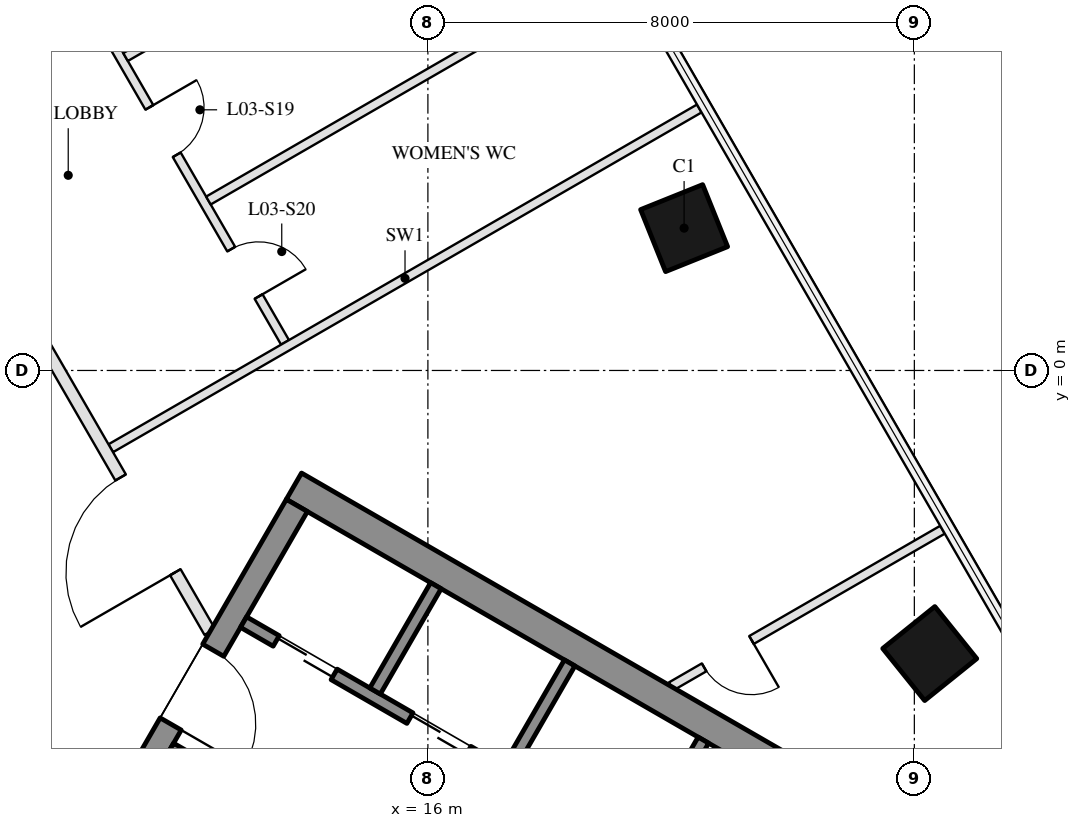
"""IFC4 building model, lengths in metres.
Left out: names, types, materials, properties, quantities, classifications, styles, units other than length and angle.
Written with IfcOpenShell. Run it as: python <this file> out.ifc"""

import sys

from ifc_helpers import new_model, si_unit, direction, frame, frame_2d, origin, origin_2d, place, context, subcontext, project, spatial, rectangle, hollow_rectangle, extrude, boolean, halfspace, element, fill, save


model = new_model("IFC4")
c1 = context("Model", 3, precision=1e-05, world=origin(), true_north=direction((0.0, 1.0)))
c2 = subcontext(c1, "Body", "Model", "MODEL_VIEW")
j1 = project(units=[si_unit("LENGTHUNIT", "METRE"), si_unit("PLANEANGLEUNIT", "RADIAN")], contexts=[c1])
p1 = place(None, origin())
s1 = spatial("IfcSite", under=j1, at=p1, CompositionType="ELEMENT")
p2 = place(p1, origin())
s2 = spatial("IfcBuilding", under=s1, at=p2, CompositionType="ELEMENT")
p3 = place(p2, frame((0.0, 0.0, 23.5)))
s3 = spatial("IfcBuildingStorey", under=s2, at=p3, CompositionType="ELEMENT", Elevation=23.5)
p4 = place(p3, frame((24.253, -4.656, 0.0), z_axis=(-0.066256812747, 0.010279549625, 0.997749650776), x_axis=(0.498832862409, -0.865677791145, 0.042044468106)))
e1 = element("IfcColumn", 1, at=p4, inside=s3, PredefinedType="COLUMN", context=c2, shape_type="SweptSolid", body=[
    boolean("DIFFERENCE", boolean("DIFFERENCE", extrude(hollow_rectangle(XDim=1.1, YDim=1.1, WallThickness=0.05, at=origin_2d()), origin(), (0.0, 0.0, 1.0), 5.011), halfspace(frame((0.0, 0.0, 0.017), z_axis=(0.0, 0.0, 1.0), x_axis=(1.0, 0.0, 0.0)), True)), halfspace(frame((0.0, 0.0, 4.999), z_axis=(0.0, 0.0, 1.0), x_axis=(1.0, 0.0, 0.0)), False)),
])
p5 = place(p3, frame((20.214, 2.341, 0.0), z_axis=(-0.055770669369, -0.007946345373, 0.998411983118), x_axis=(0.499656252381, -0.865968742186, 0.021018254285)))
e2 = element("IfcColumn", 2, at=p5, inside=s3, PredefinedType="COLUMN", context=c2, shape_type="SweptSolid", body=[
    boolean("DIFFERENCE", boolean("DIFFERENCE", extrude(hollow_rectangle(XDim=1.1, YDim=1.1, WallThickness=0.05, at=origin_2d()), origin(), (0.0, 0.0, 1.0), 5.008), halfspace(frame((0.0, 0.0, 0.014), z_axis=(0.0, 0.0, 1.0), x_axis=(1.0, 0.0, 0.0)), True)), halfspace(frame((0.0, 0.0, 4.997), z_axis=(0.0, 0.0, 1.0), x_axis=(1.0, 0.0, 0.0)), False)),
])
p6 = place(p3, frame((13.797, -1.903, 0.0), z_axis=(0.0, 0.0, 1.0), x_axis=(0.866025760136, -0.499999382781, 0.0)))
e3 = element("IfcWall", 3, at=p6, inside=s3, PredefinedType="SHEAR", context=c2, shape_type="SweptSolid", body=[
    extrude(rectangle(XDim=15.542, YDim=0.5, at=frame_2d((7.771, 0.0))), origin(), (0.0, 0.0, 1.0), 4.7),
])
p7 = place(p3, frame((8.845, -10.88, 0.0), z_axis=(0.0, 0.0, 1.0), x_axis=(0.500004234368, 0.866022959057, 0.0)))
e4 = element("IfcWall", 4, at=p7, inside=s3, PredefinedType="SHEAR", context=c2, shape_type="SweptSolid", body=[
    extrude(rectangle(XDim=10.0, YDim=0.4, at=frame_2d((5.0, 0.0))), origin(), (0.0, 0.0, 1.0), 4.7),
])
p8 = place(p7, frame((3.55, 0.0, 0.0)))
e5 = element("IfcOpeningElement", 5, at=p8, cuts=e4, PredefinedType="OPENING", context=c2, shape_type="SweptSolid", body=[
    extrude(rectangle(XDim=1.1, YDim=2.1, at=frame_2d((0.55, 1.05))), frame((0.0, 0.21, 0.0), z_axis=(0.0, -1.0, 0.0), x_axis=(1.0, 0.0, 0.0)), (0.0, 0.0, 1.0), 0.42),
])
p9 = place(p7, frame((5.85, 0.0, 0.0)))
e6 = element("IfcOpeningElement", 6, at=p9, cuts=e4, PredefinedType="OPENING", context=c2, shape_type="SweptSolid", body=[
    extrude(rectangle(XDim=1.4, YDim=2.1, at=frame_2d((0.7, 1.05))), frame((0.0, 0.21, 0.0), z_axis=(0.0, -1.0, 0.0), x_axis=(1.0, 0.0, 0.0)), (0.0, 0.0, 1.0), 0.42),
])
p10 = place(p3, frame((11.768, -6.217, 0.0), z_axis=(0.0, 0.0, 1.0), x_axis=(0.866050077142, -0.499957262057, 0.0)))
e7 = element("IfcWall", 7, at=p10, inside=s3, PredefinedType="SHEAR", context=c2, shape_type="SweptSolid", body=[
    extrude(rectangle(XDim=2.4, YDim=0.2, at=frame_2d((1.2, 0.0))), origin(), (0.0, 0.0, 1.0), 4.7),
])
p11 = place(p3, frame((12.968, -4.138, 0.0), z_axis=(0.0, 0.0, 1.0), x_axis=(0.866028328073, -0.49999493495, 0.0)))
e8 = element("IfcWall", 8, at=p11, inside=s3, PredefinedType="SHEAR", context=c2, shape_type="SweptSolid", body=[
    extrude(rectangle(XDim=10.16, YDim=0.2, at=frame_2d((5.08, 0.0))), origin(), (0.0, 0.0, 1.0), 4.7),
])
p12 = place(p11, frame((0.62, 0.0, 0.0)))
e9 = element("IfcOpeningElement", 9, at=p12, cuts=e8, PredefinedType="OPENING", context=c2, shape_type="SweptSolid", body=[
    extrude(rectangle(XDim=1.1, YDim=2.1, at=frame_2d((0.55, 1.05))), frame((0.0, 0.11, 0.0), z_axis=(0.0, -1.0, 0.0), x_axis=(1.0, 0.0, 0.0)), (0.0, 0.0, 1.0), 0.22),
])
p13 = place(p11, frame((3.16, 0.0, 0.0)))
e10 = element("IfcOpeningElement", 10, at=p13, cuts=e8, PredefinedType="OPENING", context=c2, shape_type="SweptSolid", body=[
    extrude(rectangle(XDim=1.1, YDim=2.1, at=frame_2d((0.55, 1.05))), frame((0.0, 0.11, 0.0), z_axis=(0.0, -1.0, 0.0), x_axis=(1.0, 0.0, 0.0)), (0.0, 0.0, 1.0), 0.22),
])
p14 = place(p11, frame((5.7, 0.0, 0.0)))
e11 = element("IfcOpeningElement", 11, at=p14, cuts=e8, PredefinedType="OPENING", context=c2, shape_type="SweptSolid", body=[
    extrude(rectangle(XDim=1.1, YDim=2.1, at=frame_2d((0.55, 1.05))), frame((0.0, 0.11, 0.0), z_axis=(0.0, -1.0, 0.0), x_axis=(1.0, 0.0, 0.0)), (0.0, 0.0, 1.0), 0.22),
])
p15 = place(p11, frame((8.24, 0.0, 0.0)))
e12 = element("IfcOpeningElement", 12, at=p15, cuts=e8, PredefinedType="OPENING", context=c2, shape_type="SweptSolid", body=[
    extrude(rectangle(XDim=1.1, YDim=2.1, at=frame_2d((0.55, 1.05))), frame((0.0, 0.11, 0.0), z_axis=(0.0, -1.0, 0.0), x_axis=(1.0, 0.0, 0.0)), (0.0, 0.0, 1.0), 0.22),
])
for number, where, z_axis, x_axis in (
    (13, (15.131, -5.272, 0.0), (0.0, 0.0, 1.0), (0.5, 0.866, 0.0)),
    (14, (17.331, -6.542, 0.0), (0.0, 0.0, 1.0), (0.5, 0.866, 0.0)),
    (15, (19.531, -7.812, 0.0), (0.0, 0.0, 1.0), (0.5, 0.866, 0.0)),
):
    element("IfcWall", number, at=place(p3, frame(where, z_axis=z_axis, x_axis=x_axis)), inside=s3, PredefinedType="SHEAR", context=c2, shape_type="SweptSolid", body=[
        extrude(rectangle(XDim=2.0, YDim=0.2, at=frame_2d((1.0, 0.0))), origin(), (0.0, 0.0, 1.0), 4.7),
    ])
p16 = place(p3, frame((13.65, 0.462, 0.0), z_axis=(0.0, 0.0, 1.0), x_axis=(-0.499983926186, 0.866034683806, 0.0)))
e16 = element("IfcWall", 16, at=p16, inside=s3, PredefinedType="PARTITIONING", context=c2, shape_type="SweptSolid", body=[
    extrude(rectangle(XDim=8.325, YDim=0.15, at=frame_2d((4.163, 0.0))), origin(), (0.0, 0.0, 1.0), 3.91),
])
p17 = place(p16, frame((6.354, 0.0, 0.0)))
e17 = element("IfcOpeningElement", 17, at=p17, cuts=e16, PredefinedType="OPENING", context=c2, shape_type="SweptSolid", body=[
    extrude(rectangle(XDim=1.0, YDim=2.1, at=frame_2d((0.5, 1.05))), frame((0.0, 0.085, 0.0), z_axis=(0.0, -1.0, 0.0), x_axis=(1.0, 0.0, 0.0)), (0.0, 0.0, 1.0), 0.17),
])
p18 = place(p16, frame((3.562, 0.0, 0.0)))
e18 = element("IfcOpeningElement", 18, at=p18, cuts=e16, PredefinedType="OPENING", context=c2, shape_type="SweptSolid", body=[
    extrude(rectangle(XDim=0.9, YDim=2.1, at=frame_2d((0.45, 1.05))), frame((0.0, 0.085, 0.0), z_axis=(0.0, -1.0, 0.0), x_axis=(1.0, 0.0, 0.0)), (0.0, 0.0, 1.0), 0.17),
])
p19 = place(p16, frame((0.871, 0.0, 0.0)))
e19 = element("IfcOpeningElement", 19, at=p19, cuts=e16, PredefinedType="OPENING", context=c2, shape_type="SweptSolid", body=[
    extrude(rectangle(XDim=0.9, YDim=2.1, at=frame_2d((0.45, 1.05))), frame((0.0, 0.085, 0.0), z_axis=(0.0, -1.0, 0.0), x_axis=(1.0, 0.0, 0.0)), (0.0, 0.0, 1.0), 0.17),
])
p20 = place(p3, frame((24.463, -2.619, 0.0), z_axis=(0.0, 0.0, 1.0), x_axis=(-0.866015973267, -0.50001633378, 0.0)))
e20 = element("IfcWall", 20, at=p20, inside=s3, PredefinedType="PARTITIONING", context=c2, shape_type="SweptSolid", body=[
    extrude(rectangle(XDim=5.154, YDim=0.15, at=frame_2d((2.577, 0.0))), origin(), (0.0, 0.0, 1.0), 4.1),
])
p21 = place(p20, frame((3.627, 0.0, 0.0)))
e21 = element("IfcOpeningElement", 21, at=p21, cuts=e20, PredefinedType="OPENING", context=c2, shape_type="SweptSolid", body=[
    extrude(rectangle(XDim=0.9, YDim=2.1, at=frame_2d((0.45, 1.05))), frame((0.0, 0.085, 0.0), z_axis=(0.0, -1.0, 0.0), x_axis=(1.0, 0.0, 0.0)), (0.0, 0.0, 1.0), 0.17),
])
p22 = place(p3, frame((20.463, 4.309, 0.0), z_axis=(0.0, 0.0, 1.0), x_axis=(-0.866020428917, -0.500008616625, 0.0)))
e22 = element("IfcWall", 22, at=p22, inside=s3, PredefinedType="PARTITIONING", context=c2, shape_type="SweptSolid", body=[
    extrude(rectangle(XDim=11.176, YDim=0.15, at=frame_2d((5.588, 0.0))), origin(), (0.0, 0.0, 1.0), 4.1),
])
p23 = place(p3, frame((19.101, 6.669, 0.0), z_axis=(0.0, 0.0, 1.0), x_axis=(-0.866031845665, -0.499988842169, 0.0)))
e23 = element("IfcWall", 23, at=p23, inside=s3, PredefinedType="PARTITIONING", context=c2, shape_type="SweptSolid", body=[
    extrude(rectangle(XDim=7.748, YDim=0.15, at=frame_2d((3.874, 0.0))), origin(), (0.0, 0.0, 1.0), 3.91),
])
p24 = place(p3, frame((17.738, 9.029, 0.0), z_axis=(0.0, 0.0, 1.0), x_axis=(-0.866010323949, -0.500026118132, 0.0)))
e24 = element("IfcWall", 24, at=p24, inside=s3, PredefinedType="PARTITIONING", context=c2, shape_type="SweptSolid", body=[
    extrude(rectangle(XDim=7.748, YDim=0.15, at=frame_2d((3.874, 0.0))), origin(), (0.0, 0.0, 1.0), 4.1),
])
p25 = place(p3, frame((12.413, -4.3, 0.0), z_axis=(0.0, 0.0, 1.0), x_axis=(-0.50000478328, 0.866022642139, 0.0)))
e25 = element("IfcWall", 25, at=p25, inside=s3, PredefinedType="PARTITIONING", context=c2, shape_type="SweptSolid", body=[
    extrude(rectangle(XDim=19.861, YDim=0.2, at=frame_2d((9.931, 0.0))), origin(), (0.0, 0.0, 1.0), 3.91),
])
p26 = place(p25, frame((1.134, 0.0, 0.0)))
e26 = element("IfcOpeningElement", 26, at=p26, cuts=e25, PredefinedType="OPENING", context=c2, shape_type="SweptSolid", body=[
    extrude(rectangle(XDim=1.8, YDim=2.4, at=frame_2d((0.9, 1.2))), frame((0.0, 0.11, 0.0), z_axis=(0.0, -1.0, 0.0), x_axis=(1.0, 0.0, 0.0)), (0.0, 0.0, 1.0), 0.22),
])
p27 = place(p25, frame((17.59, 0.0, 0.0)))
e27 = element("IfcOpeningElement", 27, at=p27, cuts=e25, PredefinedType="OPENING", context=c2, shape_type="SweptSolid", body=[
    extrude(rectangle(XDim=1.0, YDim=2.1, at=frame_2d((0.5, 1.05))), frame((0.0, 0.11, 0.0), z_axis=(0.0, -1.0, 0.0), x_axis=(1.0, 0.0, 0.0)), (0.0, 0.0, 1.0), 0.22),
])
p28 = place(p25, frame((13.23, 0.0, 0.0)))
e28 = element("IfcOpeningElement", 28, at=p28, cuts=e25, PredefinedType="OPENING", context=c2, shape_type="SweptSolid", body=[
    extrude(rectangle(XDim=1.8, YDim=2.1, at=frame_2d((0.9, 1.05))), frame((0.0, 0.11, 0.0), z_axis=(0.0, -1.0, 0.0), x_axis=(1.0, 0.0, 0.0)), (0.0, 0.0, 1.0), 0.22),
])
p29 = place(p25, frame((7.168, 0.0, 0.0)))
e29 = element("IfcOpeningElement", 29, at=p29, cuts=e25, PredefinedType="OPENING", context=c2, shape_type="SweptSolid", body=[
    extrude(rectangle(XDim=1.0, YDim=2.1, at=frame_2d((0.5, 1.05))), frame((0.0, 0.11, 0.0), z_axis=(0.0, -1.0, 0.0), x_axis=(1.0, 0.0, 0.0)), (0.0, 0.0, 1.0), 0.22),
])
p30 = place(p12, origin())
e30 = element("IfcDoor", 30, at=p30, inside=s3, OperationType="DOUBLE_DOOR_SLIDING", PredefinedType="DOOR", context=c2, shape_type="SweptSolid", body=[
    extrude(rectangle(XDim=1.1, YDim=2.1, at=frame_2d((0.55, 1.05))), frame((0.0, 0.025, 0.0), z_axis=(0.0, -1.0, 0.0), x_axis=(1.0, 0.0, 0.0)), (0.0, 0.0, 1.0), 0.05),
])
fill(e9, e30)
p31 = place(p13, origin())
e31 = element("IfcDoor", 31, at=p31, inside=s3, OperationType="DOUBLE_DOOR_SLIDING", PredefinedType="DOOR", context=c2, shape_type="SweptSolid", body=[
    extrude(rectangle(XDim=1.1, YDim=2.1, at=frame_2d((0.55, 1.05))), frame((0.0, 0.025, 0.0), z_axis=(0.0, -1.0, 0.0), x_axis=(1.0, 0.0, 0.0)), (0.0, 0.0, 1.0), 0.05),
])
fill(e10, e31)
p32 = place(p9, frame((1.4, 0.0, 0.0), z_axis=(0.0, 0.0, 1.0), x_axis=(-1.0, 0.0, 0.0)))
e32 = element("IfcDoor", 32, at=p32, inside=s3, OperationType="DOUBLE_DOOR_SINGLE_SWING", PredefinedType="DOOR", context=c2, shape_type="SweptSolid", body=[
    extrude(rectangle(XDim=1.4, YDim=2.1, at=frame_2d((0.7, 1.05))), frame((0.0, 0.025, 0.0), z_axis=(0.0, -1.0, 0.0), x_axis=(1.0, 0.0, 0.0)), (0.0, 0.0, 1.0), 0.05),
])
fill(e6, e32)
p33 = place(p26, origin())
e33 = element("IfcDoor", 33, at=p33, inside=s3, OperationType="DOUBLE_DOOR_SINGLE_SWING", PredefinedType="DOOR", context=c2, shape_type="SweptSolid", body=[
    extrude(rectangle(XDim=1.8, YDim=2.4, at=frame_2d((0.9, 1.2))), frame((0.0, 0.025, 0.0), z_axis=(0.0, -1.0, 0.0), x_axis=(1.0, 0.0, 0.0)), (0.0, 0.0, 1.0), 0.05),
])
fill(e26, e33)
p34 = place(p21, origin())
e34 = element("IfcDoor", 34, at=p34, inside=s3, OperationType="SINGLE_SWING_LEFT", PredefinedType="DOOR", context=c2, shape_type="SweptSolid", body=[
    extrude(rectangle(XDim=0.9, YDim=2.1, at=frame_2d((0.45, 1.05))), frame((0.0, 0.025, 0.0), z_axis=(0.0, -1.0, 0.0), x_axis=(1.0, 0.0, 0.0)), (0.0, 0.0, 1.0), 0.05),
])
fill(e21, e34)
p35 = place(p18, frame((0.9, 0.0, 0.0), z_axis=(0.0, 0.0, 1.0), x_axis=(-1.0, 0.0, 0.0)))
e35 = element("IfcDoor", 35, at=p35, inside=s3, OperationType="SINGLE_SWING_LEFT", PredefinedType="DOOR", context=c2, shape_type="SweptSolid", body=[
    extrude(rectangle(XDim=0.9, YDim=2.1, at=frame_2d((0.45, 1.05))), frame((0.0, 0.025, 0.0), z_axis=(0.0, -1.0, 0.0), x_axis=(1.0, 0.0, 0.0)), (0.0, 0.0, 1.0), 0.05),
])
fill(e18, e35)
p36 = place(p19, frame((0.9, 0.0, 0.0), z_axis=(0.0, 0.0, 1.0), x_axis=(-1.0, 0.0, 0.0)))
e36 = element("IfcDoor", 36, at=p36, inside=s3, OperationType="SINGLE_SWING_RIGHT", PredefinedType="DOOR", context=c2, shape_type="SweptSolid", body=[
    extrude(rectangle(XDim=0.9, YDim=2.1, at=frame_2d((0.45, 1.05))), frame((0.0, 0.025, 0.0), z_axis=(0.0, -1.0, 0.0), x_axis=(1.0, 0.0, 0.0)), (0.0, 0.0, 1.0), 0.05),
])
fill(e19, e36)
save(model, sys.argv[1])
